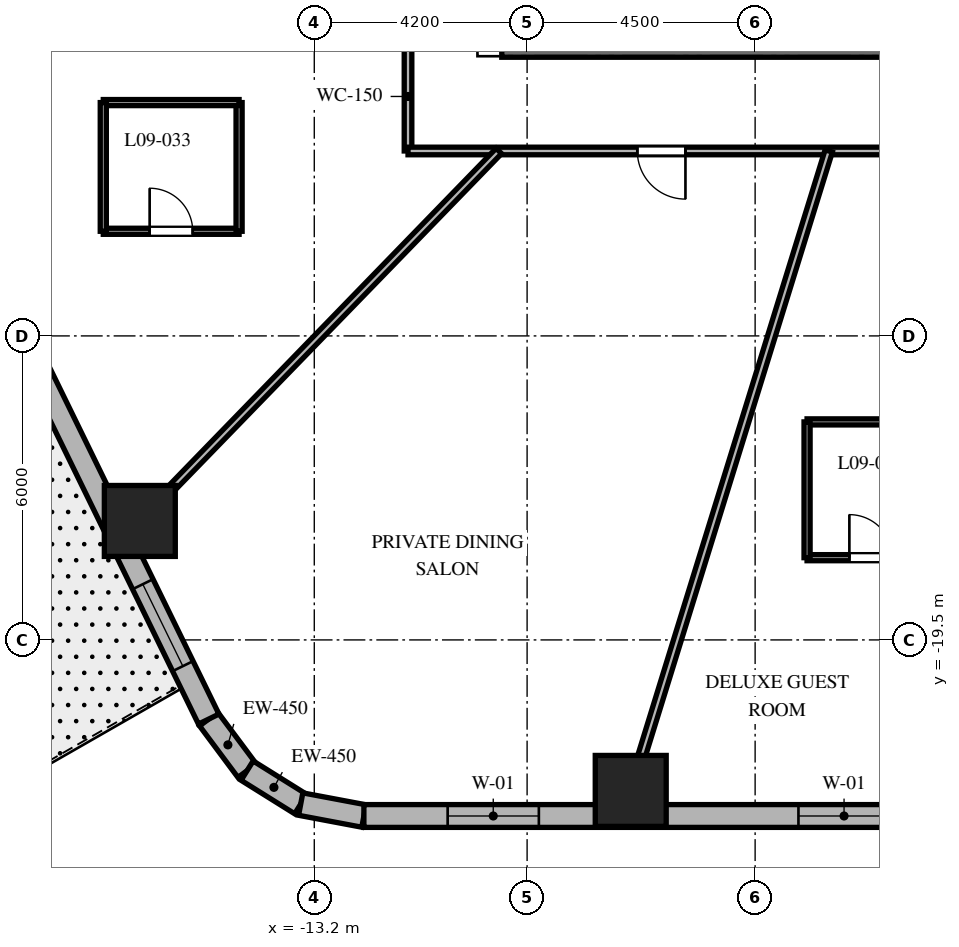
"""IFC4 building model, lengths in metres.
Left out: names, types, materials, properties, quantities, classifications, styles, units other than length and angle.
Written with IfcOpenShell. Run it as: python <this file> out.ifc"""

import sys

from ifc_helpers import new_model, si_unit, direction, frame, frame_2d, origin, origin_2d, place, context, subcontext, project, spatial, rectangle, extrude, element, fill, save


model = new_model("IFC4")
c1 = context("Model", 3, precision=1e-05, world=origin(), true_north=direction((0.0, 1.0)))
c2 = subcontext(c1, "Body", "Model", "MODEL_VIEW")
j1 = project(units=[si_unit("LENGTHUNIT", "METRE"), si_unit("PLANEANGLEUNIT", "RADIAN")], contexts=[c1])
p1 = place(None, origin())
s1 = spatial("IfcSite", under=j1, at=p1, CompositionType="ELEMENT")
p2 = place(p1, origin())
s2 = spatial("IfcBuilding", under=s1, at=p2, CompositionType="ELEMENT")
p3 = place(p2, frame((0.0, 0.0, 45.3)))
s3 = spatial("IfcBuildingStorey", under=s2, at=p3, CompositionType="ELEMENT", Elevation=45.3)
p4 = place(p3, frame((-9.5, -7.5, 0.0), z_axis=(0.0, 0.0, 1.0), x_axis=(1.0, 0.0, 0.0)))
e1 = element("IfcWall", 1, at=p4, inside=s3, PredefinedType="SHEAR", context=c2, shape_type="SweptSolid", body=[
    extrude(rectangle(XDim=19.0, YDim=1.0, at=frame_2d((9.5, 0.0))), origin(), (0.0, 0.0, 1.0), 3.7),
])
p5 = place(p4, frame((9.55, 0.0, 0.0)))
e2 = element("IfcOpeningElement", 2, at=p5, cuts=e1, PredefinedType="OPENING", context=c2, shape_type="SweptSolid", body=[
    extrude(rectangle(XDim=1.0, YDim=2.15, at=frame_2d((0.5, 1.075))), frame((0.0, 0.51, 0.0), z_axis=(0.0, -1.0, 0.0), x_axis=(1.0, 0.0, 0.0)), (0.0, 0.0, 1.0), 1.02),
])
for number, where, z_axis, x_axis in (
    (3, (-6.955, -22.48, 0.0), (0.0, 0.0, 1.0), (1.0, 0.0, 0.0)),
    (4, (-16.643, -17.152, 0.0), (0.0, 0.0, 1.0), (1.0, 0.0, 0.0)),
):
    element("IfcColumn", number, at=place(p3, frame(where, z_axis=z_axis, x_axis=x_axis)), inside=s3, PredefinedType="COLUMN", context=c2, shape_type="SweptSolid", body=[
        extrude(rectangle(XDim=1.4, YDim=1.4, at=origin_2d()), origin(), (0.0, 0.0, 1.0), 3.7),
    ])
p6 = place(p3, frame((-15.284, -21.062, 0.0), z_axis=(0.0, 0.0, 1.0), x_axis=(0.597595366449, -0.801797841104, 0.0)))
e5 = element("IfcWall", 5, at=p6, inside=s3, PredefinedType="SOLIDWALL", context=c2, shape_type="SweptSolid", body=[
    extrude(rectangle(XDim=1.269, YDim=0.45, at=frame_2d((0.634, 0.0))), origin(), (0.0, 0.0, 1.0), 3.4),
])
p7 = place(p3, frame((-14.526, -22.08, 0.0), z_axis=(0.0, 0.0, 1.0), x_axis=(0.848185203596, -0.529699783275, 0.0)))
e6 = element("IfcWall", 6, at=p7, inside=s3, PredefinedType="SOLIDWALL", context=c2, shape_type="SweptSolid", body=[
    extrude(rectangle(XDim=1.247, YDim=0.45, at=frame_2d((0.624, 0.0))), origin(), (0.0, 0.0, 1.0), 3.4),
])
p8 = place(p3, frame((-13.468, -22.74, 0.0), z_axis=(0.0, 0.0, 1.0), x_axis=(0.982717174228, -0.185113358451, 0.0)))
e7 = element("IfcWall", 7, at=p8, inside=s3, PredefinedType="SOLIDWALL", context=c2, shape_type="SweptSolid", body=[
    extrude(rectangle(XDim=1.269, YDim=0.45, at=frame_2d((0.634, 0.0))), origin(), (0.0, 0.0, 1.0), 3.4),
])
p9 = place(p3, frame((-12.221, -22.975, 0.0), z_axis=(0.0, 0.0, 1.0), x_axis=(1.0, 0.0, 0.0)))
e8 = element("IfcWall", 8, at=p9, inside=s3, PredefinedType="SOLIDWALL", context=c2, shape_type="SweptSolid", body=[
    extrude(rectangle(XDim=26.389, YDim=0.45, at=frame_2d((13.195, 0.0))), origin(), (0.0, 0.0, 1.0), 3.4),
])
p10 = place(p9, frame((1.653, 0.0, 0.8)))
e9 = element("IfcOpeningElement", 9, at=p10, cuts=e8, PredefinedType="OPENING", context=c2, shape_type="SweptSolid", body=[
    extrude(rectangle(XDim=1.8, YDim=1.8, at=frame_2d((0.9, 0.9))), frame((0.0, 0.235, 0.0), z_axis=(0.0, -1.0, 0.0), x_axis=(1.0, 0.0, 0.0)), (0.0, 0.0, 1.0), 0.47),
])
p11 = place(p9, frame((8.576, 0.0, 0.8)))
e10 = element("IfcOpeningElement", 10, at=p11, cuts=e8, PredefinedType="OPENING", context=c2, shape_type="SweptSolid", body=[
    extrude(rectangle(XDim=1.8, YDim=1.8, at=frame_2d((0.9, 0.9))), frame((0.0, 0.235, 0.0), z_axis=(0.0, -1.0, 0.0), x_axis=(1.0, 0.0, 0.0)), (0.0, 0.0, 1.0), 0.47),
])
p12 = place(p9, frame((15.927, 0.0, 0.8)))
e11 = element("IfcOpeningElement", 11, at=p12, cuts=e8, PredefinedType="OPENING", context=c2, shape_type="SweptSolid", body=[
    extrude(rectangle(XDim=1.8, YDim=1.8, at=frame_2d((0.9, 0.9))), frame((0.0, 0.235, 0.0), z_axis=(0.0, -1.0, 0.0), x_axis=(1.0, 0.0, 0.0)), (0.0, 0.0, 1.0), 0.47),
])
p13 = place(p9, frame((22.938, 0.0, 0.8)))
e12 = element("IfcOpeningElement", 12, at=p13, cuts=e8, PredefinedType="OPENING", context=c2, shape_type="SweptSolid", body=[
    extrude(rectangle(XDim=1.8, YDim=1.8, at=frame_2d((0.9, 0.9))), frame((0.0, 0.235, 0.0), z_axis=(0.0, -1.0, 0.0), x_axis=(1.0, 0.0, 0.0)), (0.0, 0.0, 1.0), 0.47),
])
p14 = place(p3, frame((-24.336, -2.532, 0.0), z_axis=(0.0, 0.0, 1.0), x_axis=(0.438931326393, -0.898520612291, 0.0)))
e13 = element("IfcWall", 13, at=p14, inside=s3, PredefinedType="SOLIDWALL", context=c2, shape_type="SweptSolid", body=[
    extrude(rectangle(XDim=20.623, YDim=0.45, at=frame_2d((10.312, 0.0))), origin(), (0.0, 0.0, 1.0), 3.4),
])
p15 = place(p14, frame((5.171, 0.0, 0.0)))
e14 = element("IfcOpeningElement", 14, at=p15, cuts=e13, PredefinedType="OPENING", context=c2, shape_type="SweptSolid", body=[
    extrude(rectangle(XDim=0.95, YDim=2.15, at=frame_2d((0.475, 1.075))), frame((0.0, 0.235, 0.0), z_axis=(0.0, -1.0, 0.0), x_axis=(1.0, 0.0, 0.0)), (0.0, 0.0, 1.0), 0.47),
])
p16 = place(p14, frame((1.214, 0.0, 0.8)))
e15 = element("IfcOpeningElement", 15, at=p16, cuts=e13, PredefinedType="OPENING", context=c2, shape_type="SweptSolid", body=[
    extrude(rectangle(XDim=1.8, YDim=1.8, at=frame_2d((0.9, 0.9))), frame((0.0, 0.235, 0.0), z_axis=(0.0, -1.0, 0.0), x_axis=(1.0, 0.0, 0.0)), (0.0, 0.0, 1.0), 0.47),
])
p17 = place(p14, frame((9.462, 0.0, 0.8)))
e16 = element("IfcOpeningElement", 16, at=p17, cuts=e13, PredefinedType="OPENING", context=c2, shape_type="SweptSolid", body=[
    extrude(rectangle(XDim=1.8, YDim=1.8, at=frame_2d((0.9, 0.9))), frame((0.0, 0.235, 0.0), z_axis=(0.0, -1.0, 0.0), x_axis=(1.0, 0.0, 0.0)), (0.0, 0.0, 1.0), 0.47),
])
p18 = place(p14, frame((17.66, 0.0, 0.8)))
e17 = element("IfcOpeningElement", 17, at=p18, cuts=e13, PredefinedType="OPENING", context=c2, shape_type="SweptSolid", body=[
    extrude(rectangle(XDim=1.8, YDim=1.8, at=frame_2d((0.9, 0.9))), frame((0.0, 0.235, 0.0), z_axis=(0.0, -1.0, 0.0), x_axis=(1.0, 0.0, 0.0)), (0.0, 0.0, 1.0), 0.47),
])
p19 = place(p3, frame((-11.35, -9.85, 0.0), z_axis=(0.0, 0.0, 1.0), x_axis=(0.0, 1.0, 0.0)))
e18 = element("IfcWall", 18, at=p19, inside=s3, PredefinedType="PARTITIONING", context=c2, shape_type="SweptSolid", body=[
    extrude(rectangle(XDim=19.7, YDim=0.15, at=frame_2d((9.85, 0.0))), origin(), (0.0, 0.0, 1.0), 2.84),
])
p20 = place(p19, frame((17.181, 0.0, 0.0)))
e19 = element("IfcOpeningElement", 19, at=p20, cuts=e18, PredefinedType="OPENING", context=c2, shape_type="SweptSolid", body=[
    extrude(rectangle(XDim=0.95, YDim=2.03, at=frame_2d((0.475, 1.015))), frame((0.0, 0.085, 0.0), z_axis=(0.0, -1.0, 0.0), x_axis=(1.0, 0.0, 0.0)), (0.0, 0.0, 1.0), 0.17),
])
p21 = place(p19, frame((13.403, 0.0, 0.0)))
e20 = element("IfcOpeningElement", 20, at=p21, cuts=e18, PredefinedType="OPENING", context=c2, shape_type="SweptSolid", body=[
    extrude(rectangle(XDim=0.95, YDim=2.03, at=frame_2d((0.475, 1.015))), frame((0.0, 0.085, 0.0), z_axis=(0.0, -1.0, 0.0), x_axis=(1.0, 0.0, 0.0)), (0.0, 0.0, 1.0), 0.17),
])
p22 = place(p19, frame((10.134, 0.0, 0.0)))
e21 = element("IfcOpeningElement", 21, at=p22, cuts=e18, PredefinedType="OPENING", context=c2, shape_type="SweptSolid", body=[
    extrude(rectangle(XDim=0.95, YDim=2.03, at=frame_2d((0.475, 1.015))), frame((0.0, 0.085, 0.0), z_axis=(0.0, -1.0, 0.0), x_axis=(1.0, 0.0, 0.0)), (0.0, 0.0, 1.0), 0.17),
])
p23 = place(p19, frame((7.571, 0.0, 0.0)))
e22 = element("IfcOpeningElement", 22, at=p23, cuts=e18, PredefinedType="OPENING", context=c2, shape_type="SweptSolid", body=[
    extrude(rectangle(XDim=0.95, YDim=2.03, at=frame_2d((0.475, 1.015))), frame((0.0, 0.085, 0.0), z_axis=(0.0, -1.0, 0.0), x_axis=(1.0, 0.0, 0.0)), (0.0, 0.0, 1.0), 0.17),
])
p24 = place(p19, frame((3.024, 0.0, 0.0)))
e23 = element("IfcOpeningElement", 23, at=p24, cuts=e18, PredefinedType="OPENING", context=c2, shape_type="SweptSolid", body=[
    extrude(rectangle(XDim=0.95, YDim=2.03, at=frame_2d((0.475, 1.015))), frame((0.0, 0.085, 0.0), z_axis=(0.0, -1.0, 0.0), x_axis=(1.0, 0.0, 0.0)), (0.0, 0.0, 1.0), 0.17),
])
p25 = place(p3, frame((11.35, -9.85, 0.0), z_axis=(0.0, 0.0, 1.0), x_axis=(-1.0, 0.0, 0.0)))
e24 = element("IfcWall", 24, at=p25, inside=s3, PredefinedType="PARTITIONING", context=c2, shape_type="SweptSolid", body=[
    extrude(rectangle(XDim=22.7, YDim=0.15, at=frame_2d((11.35, 0.0))), origin(), (0.0, 0.0, 1.0), 2.84),
])
p26 = place(p25, frame((17.225, 0.0, 0.0)))
e25 = element("IfcOpeningElement", 25, at=p26, cuts=e24, PredefinedType="OPENING", context=c2, shape_type="SweptSolid", body=[
    extrude(rectangle(XDim=0.95, YDim=2.03, at=frame_2d((0.475, 1.015))), frame((0.0, 0.085, 0.0), z_axis=(0.0, -1.0, 0.0), x_axis=(1.0, 0.0, 0.0)), (0.0, 0.0, 1.0), 0.17),
])
p27 = place(p25, frame((12.214, 0.0, 0.0)))
e26 = element("IfcOpeningElement", 26, at=p27, cuts=e24, PredefinedType="OPENING", context=c2, shape_type="SweptSolid", body=[
    extrude(rectangle(XDim=0.95, YDim=2.03, at=frame_2d((0.475, 1.015))), frame((0.0, 0.085, 0.0), z_axis=(0.0, -1.0, 0.0), x_axis=(1.0, 0.0, 0.0)), (0.0, 0.0, 1.0), 0.17),
])
p28 = place(p25, frame((8.725, 0.0, 0.0)))
e27 = element("IfcOpeningElement", 27, at=p28, cuts=e24, PredefinedType="OPENING", context=c2, shape_type="SweptSolid", body=[
    extrude(rectangle(XDim=0.95, YDim=2.03, at=frame_2d((0.475, 1.015))), frame((0.0, 0.085, 0.0), z_axis=(0.0, -1.0, 0.0), x_axis=(1.0, 0.0, 0.0)), (0.0, 0.0, 1.0), 0.17),
])
p29 = place(p25, frame((3.369, 0.0, 0.0)))
e28 = element("IfcOpeningElement", 28, at=p29, cuts=e24, PredefinedType="OPENING", context=c2, shape_type="SweptSolid", body=[
    extrude(rectangle(XDim=0.95, YDim=2.03, at=frame_2d((0.475, 1.015))), frame((0.0, 0.085, 0.0), z_axis=(0.0, -1.0, 0.0), x_axis=(1.0, 0.0, 0.0)), (0.0, 0.0, 1.0), 0.17),
])
p30 = place(p3, frame((-9.558, -9.85, 0.0), z_axis=(0.0, 0.0, 1.0), x_axis=(-0.69638346089, -0.717669893056, 0.0)))
e29 = element("IfcWall", 29, at=p30, inside=s3, PredefinedType="PARTITIONING", context=c2, shape_type="SweptSolid", body=[
    extrude(rectangle(XDim=10.701, YDim=0.15, at=frame_2d((5.351, 0.0))), origin(), (0.0, 0.0, 1.0), 2.54),
])
p31 = place(p3, frame((-3.048, -9.85, 0.0), z_axis=(0.0, 0.0, 1.0), x_axis=(-0.295553992761, -0.955326037206, 0.0)))
e30 = element("IfcWall", 30, at=p31, inside=s3, PredefinedType="PARTITIONING", context=c2, shape_type="SweptSolid", body=[
    extrude(rectangle(XDim=13.739, YDim=0.15, at=frame_2d((6.869, 0.0))), origin(), (0.0, 0.0, 1.0), 2.54),
])
p32 = place(p3, frame((-17.364, -11.435, 0.0), z_axis=(0.0, 0.0, 1.0), x_axis=(1.0, 0.0, 0.0)))
e31 = element("IfcWall", 31, at=p32, inside=s3, PredefinedType="PARTITIONING", context=c2, shape_type="SweptSolid", body=[
    extrude(rectangle(XDim=2.68, YDim=0.12, at=frame_2d((1.34, 0.0))), origin(), (0.0, 0.0, 1.0), 2.927),
])
p33 = place(p32, frame((0.915, 0.0, 0.0)))
e32 = element("IfcOpeningElement", 32, at=p33, cuts=e31, PredefinedType="OPENING", context=c2, shape_type="SweptSolid", body=[
    extrude(rectangle(XDim=0.85, YDim=2.03, at=frame_2d((0.425, 1.015))), frame((0.0, 0.07, 0.0), z_axis=(0.0, -1.0, 0.0), x_axis=(1.0, 0.0, 0.0)), (0.0, 0.0, 1.0), 0.14),
])
p34 = place(p3, frame((-14.684, -11.435, 0.0), z_axis=(0.0, 0.0, 1.0), x_axis=(0.0, 1.0, 0.0)))
e33 = element("IfcWall", 33, at=p34, inside=s3, PredefinedType="PARTITIONING", context=c2, shape_type="SweptSolid", body=[
    extrude(rectangle(XDim=2.54, YDim=0.12, at=frame_2d((1.27, 0.0))), origin(), (0.0, 0.0, 1.0), 3.4),
])
p35 = place(p3, frame((-14.684, -8.895, 0.0), z_axis=(0.0, 0.0, 1.0), x_axis=(-1.0, 0.0, 0.0)))
e34 = element("IfcWall", 34, at=p35, inside=s3, PredefinedType="PARTITIONING", context=c2, shape_type="SweptSolid", body=[
    extrude(rectangle(XDim=2.68, YDim=0.12, at=frame_2d((1.34, 0.0))), origin(), (0.0, 0.0, 1.0), 2.927),
])
p36 = place(p3, frame((-17.364, -8.895, 0.0), z_axis=(0.0, 0.0, 1.0), x_axis=(0.0, -1.0, 0.0)))
e35 = element("IfcWall", 35, at=p36, inside=s3, PredefinedType="PARTITIONING", context=c2, shape_type="SweptSolid", body=[
    extrude(rectangle(XDim=2.54, YDim=0.12, at=frame_2d((1.27, 0.0))), origin(), (0.0, 0.0, 1.0), 3.4),
])
p37 = place(p3, frame((-3.475, -17.877, 0.0), z_axis=(0.0, 0.0, 1.0), x_axis=(1.0, 0.0, 0.0)))
e36 = element("IfcWall", 36, at=p37, inside=s3, PredefinedType="PARTITIONING", context=c2, shape_type="SweptSolid", body=[
    extrude(rectangle(XDim=2.52, YDim=0.12, at=frame_2d((1.26, 0.0))), origin(), (0.0, 0.0, 1.0), 2.84),
])
p38 = place(p37, frame((0.835, 0.0, 0.0)))
e37 = element("IfcOpeningElement", 37, at=p38, cuts=e36, PredefinedType="OPENING", context=c2, shape_type="SweptSolid", body=[
    extrude(rectangle(XDim=0.85, YDim=2.03, at=frame_2d((0.425, 1.015))), frame((0.0, 0.07, 0.0), z_axis=(0.0, -1.0, 0.0), x_axis=(1.0, 0.0, 0.0)), (0.0, 0.0, 1.0), 0.14),
])
p39 = place(p3, frame((-0.955, -15.197, 0.0), z_axis=(0.0, 0.0, 1.0), x_axis=(-1.0, 0.0, 0.0)))
e38 = element("IfcWall", 38, at=p39, inside=s3, PredefinedType="PARTITIONING", context=c2, shape_type="SweptSolid", body=[
    extrude(rectangle(XDim=2.52, YDim=0.12, at=frame_2d((1.26, 0.0))), origin(), (0.0, 0.0, 1.0), 3.4),
])
p40 = place(p3, frame((-3.475, -15.197, 0.0), z_axis=(0.0, 0.0, 1.0), x_axis=(0.0, -1.0, 0.0)))
e39 = element("IfcWall", 39, at=p40, inside=s3, PredefinedType="PARTITIONING", context=c2, shape_type="SweptSolid", body=[
    extrude(rectangle(XDim=2.68, YDim=0.12, at=frame_2d((1.34, 0.0))), origin(), (0.0, 0.0, 1.0), 2.84),
])
p41 = place(p10, origin())
e40 = element("IfcWindow", 40, at=p41, inside=s3, PartitioningType="SINGLE_PANEL", PredefinedType="WINDOW", context=c2, shape_type="SweptSolid", body=[
    extrude(rectangle(XDim=1.8, YDim=1.8, at=frame_2d((0.9, 0.9))), frame((0.0, 0.03, 0.0), z_axis=(0.0, -1.0, 0.0), x_axis=(1.0, 0.0, 0.0)), (0.0, 0.0, 1.0), 0.06),
])
fill(e9, e40)
p42 = place(p11, origin())
e41 = element("IfcWindow", 41, at=p42, inside=s3, PartitioningType="SINGLE_PANEL", PredefinedType="WINDOW", context=c2, shape_type="SweptSolid", body=[
    extrude(rectangle(XDim=1.8, YDim=1.8, at=frame_2d((0.9, 0.9))), frame((0.0, 0.03, 0.0), z_axis=(0.0, -1.0, 0.0), x_axis=(1.0, 0.0, 0.0)), (0.0, 0.0, 1.0), 0.06),
])
fill(e10, e41)
p43 = place(p18, origin())
e42 = element("IfcWindow", 42, at=p43, inside=s3, PartitioningType="SINGLE_PANEL", PredefinedType="WINDOW", context=c2, shape_type="SweptSolid", body=[
    extrude(rectangle(XDim=1.8, YDim=1.8, at=frame_2d((0.9, 0.9))), frame((0.0, 0.03, 0.0), z_axis=(0.0, -1.0, 0.0), x_axis=(1.0, 0.0, 0.0)), (0.0, 0.0, 1.0), 0.06),
])
fill(e17, e42)
p44 = place(p33, origin())
e43 = element("IfcDoor", 43, at=p44, inside=s3, OperationType="SINGLE_SWING_LEFT", PredefinedType="DOOR", context=c2, shape_type="SweptSolid", body=[
    extrude(rectangle(XDim=0.85, YDim=2.03, at=frame_2d((0.425, 1.015))), frame((0.0, 0.025, 0.0), z_axis=(0.0, -1.0, 0.0), x_axis=(1.0, 0.0, 0.0)), (0.0, 0.0, 1.0), 0.05),
])
fill(e32, e43)
p45 = place(p26, origin())
e44 = element("IfcDoor", 44, at=p45, inside=s3, OperationType="SINGLE_SWING_LEFT", PredefinedType="DOOR", context=c2, shape_type="SweptSolid", body=[
    extrude(rectangle(XDim=0.95, YDim=2.03, at=frame_2d((0.475, 1.015))), frame((0.0, 0.025, 0.0), z_axis=(0.0, -1.0, 0.0), x_axis=(1.0, 0.0, 0.0)), (0.0, 0.0, 1.0), 0.05),
])
fill(e25, e44)
p46 = place(p38, origin())
e45 = element("IfcDoor", 45, at=p46, inside=s3, OperationType="SINGLE_SWING_LEFT", PredefinedType="DOOR", context=c2, shape_type="SweptSolid", body=[
    extrude(rectangle(XDim=0.85, YDim=2.03, at=frame_2d((0.425, 1.015))), frame((0.0, 0.025, 0.0), z_axis=(0.0, -1.0, 0.0), x_axis=(1.0, 0.0, 0.0)), (0.0, 0.0, 1.0), 0.05),
])
fill(e37, e45)
save(model, sys.argv[1])
